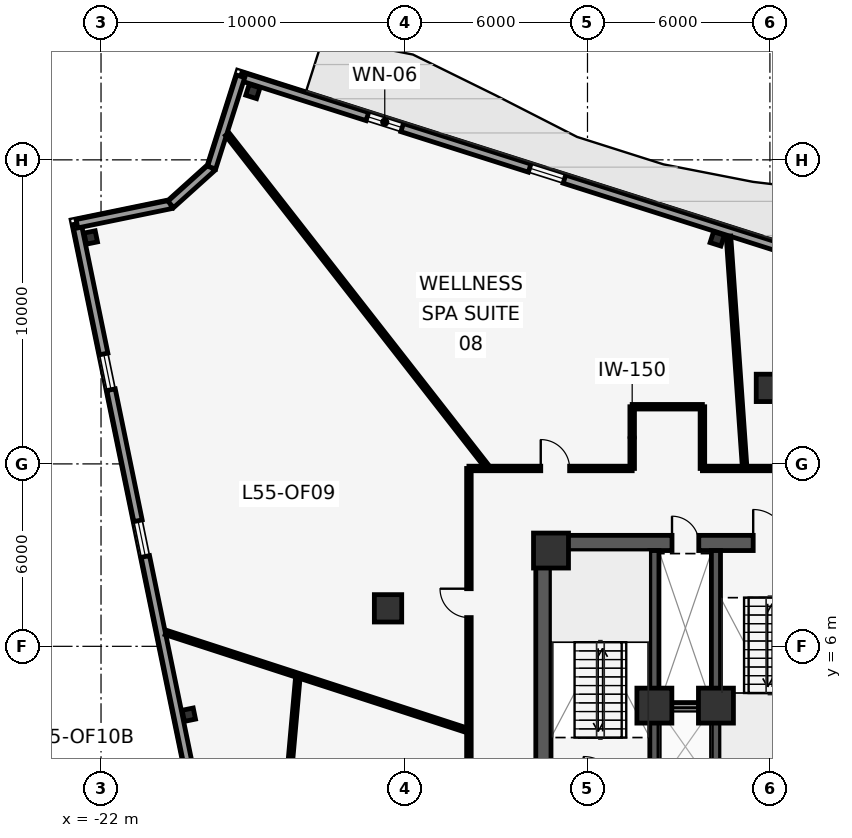
"""IFC4 building model, lengths in metres.
Left out: names, types, materials, properties, quantities, classifications, styles, units other than length and angle.
Written with IfcOpenShell. Run it as: python <this file> out.ifc"""

import sys

from ifc_helpers import new_model, si_unit, direction, frame, frame_2d, origin, origin_2d, place, context, subcontext, project, spatial, rectangle, i_section, extrude, element, fill, save


model = new_model("IFC4")
c1 = context("Model", 3, precision=1e-05, world=origin(), true_north=direction((0.0, 1.0)))
c2 = subcontext(c1, "Body", "Model", "MODEL_VIEW")
j1 = project(units=[si_unit("LENGTHUNIT", "METRE"), si_unit("PLANEANGLEUNIT", "RADIAN")], contexts=[c1])
p1 = place(None, origin())
s1 = spatial("IfcSite", under=j1, at=p1, CompositionType="ELEMENT")
p2 = place(p1, origin())
s2 = spatial("IfcBuilding", under=s1, at=p2, CompositionType="ELEMENT")
p3 = place(p2, frame((0.0, 0.0, 236.3)))
s3 = spatial("IfcBuildingStorey", under=s2, at=p3, CompositionType="ELEMENT", Elevation=236.3)
p4 = place(p3, frame((-7.45, 9.4, 0.0), z_axis=(0.0, 0.0, 1.0), x_axis=(1.0, 0.0, 0.0)))
e1 = element("IfcWall", 1, at=p4, inside=s3, PredefinedType="SHEAR", context=c2, shape_type="SweptSolid", body=[
    extrude(rectangle(XDim=14.9, YDim=0.5, at=frame_2d((7.45, 0.0))), origin(), (0.0, 0.0, 1.0), 3.85),
])
p5 = place(p4, frame((6.9, 0.0, 0.0)))
e2 = element("IfcOpeningElement", 2, at=p5, cuts=e1, PredefinedType="OPENING", context=c2, shape_type="SweptSolid", body=[
    extrude(rectangle(XDim=1.1, YDim=2.15, at=frame_2d((0.55, 1.075))), frame((0.0, 0.26, 0.0), z_axis=(0.0, -1.0, 0.0), x_axis=(1.0, 0.0, 0.0)), (0.0, 0.0, 1.0), 0.52),
])
p6 = place(p4, frame((4.23, 0.0, 0.0)))
e3 = element("IfcOpeningElement", 3, at=p6, cuts=e1, PredefinedType="OPENING", context=c2, shape_type="SweptSolid", body=[
    extrude(rectangle(XDim=0.88, YDim=2.15, at=frame_2d((0.44, 1.075))), frame((0.0, 0.26, 0.0), z_axis=(0.0, -1.0, 0.0), x_axis=(1.0, 0.0, 0.0)), (0.0, 0.0, 1.0), 0.52),
])
p7 = place(p4, frame((9.79, 0.0, 0.0)))
e4 = element("IfcOpeningElement", 4, at=p7, cuts=e1, PredefinedType="OPENING", context=c2, shape_type="SweptSolid", body=[
    extrude(rectangle(XDim=0.88, YDim=2.15, at=frame_2d((0.44, 1.075))), frame((0.0, 0.26, 0.0), z_axis=(0.0, -1.0, 0.0), x_axis=(1.0, 0.0, 0.0)), (0.0, 0.0, 1.0), 0.52),
])
for number, where, z_axis, x_axis in (
    (5, (-3.8, 1.45, 0.0), (0.0, 0.0, 1.0), (0.0, 1.0, 0.0)),
    (6, (-1.775, 1.45, 0.0), (0.0, 0.0, 1.0), (0.0, 1.0, 0.0)),
):
    element("IfcWall", number, at=place(p3, frame(where, z_axis=z_axis, x_axis=x_axis)), inside=s3, PredefinedType="SHEAR", context=c2, shape_type="SweptSolid", body=[
        extrude(rectangle(XDim=7.7, YDim=0.3, at=frame_2d((3.85, 0.0))), origin(), (0.0, 0.0, 1.0), 3.85),
    ])
p8 = place(p3, frame((-7.45, 0.1, 0.0), z_axis=(0.0, 0.0, 1.0), x_axis=(0.0, 1.0, 0.0)))
e7 = element("IfcWall", 7, at=p8, inside=s3, PredefinedType="SHEAR", context=c2, shape_type="SweptSolid", body=[
    extrude(rectangle(XDim=9.05, YDim=0.5, at=frame_2d((4.525, 0.0))), origin(), (0.0, 0.0, 1.0), 3.85),
])
for number, where, z_axis, x_axis in (
    (8, (-7.2, 9.15, 0.0), (0.0, 0.0, 1.0), (1.0, 0.0, 0.0)),
    (9, (-3.8, 4.05, 0.0), (0.0, 0.0, 1.0), (1.0, 0.0, 0.0)),
    (10, (-1.775, 4.05, 0.0), (0.0, 0.0, 1.0), (1.0, 0.0, 0.0)),
):
    element("IfcColumn", number, at=place(p3, frame(where, z_axis=z_axis, x_axis=x_axis)), inside=s3, PredefinedType="COLUMN", context=c2, shape_type="SweptSolid", body=[
        extrude(rectangle(XDim=1.15, YDim=1.15, at=origin_2d()), origin(), (0.0, 0.0, 1.0), 4.1),
    ])
for number, where, z_axis, x_axis in (
    (11, (0.0, 14.5, 0.0), (0.0, 0.0, 1.0), (1.0, 0.0, 0.0)),
    (12, (-12.56, 7.25, 0.0), (0.0, 0.0, 1.0), (1.0, 0.0, 0.0)),
):
    element("IfcColumn", number, at=place(p3, frame(where, z_axis=z_axis, x_axis=x_axis)), inside=s3, PredefinedType="COLUMN", context=c2, shape_type="SweptSolid", body=[
        extrude(rectangle(XDim=0.9, YDim=0.9, at=origin_2d()), origin(), (0.0, 0.0, 1.0), 4.1),
    ])
for number, where, z_axis, x_axis in (
    (13, (-22.337, 19.447, 0.0), (0.0, 0.0, 1.0), (-0.201, 0.98, 0.0)),
    (14, (-19.113, 3.751, 0.0), (0.0, 0.0, 1.0), (-0.201, 0.98, 0.0)),
    (15, (-1.733, 19.4, 0.0), (0.0, 0.0, 1.0), (-0.953, 0.303, 0.0)),
    (16, (-17.005, 24.248, 0.0), (0.0, 0.0, 1.0), (-0.953, 0.303, 0.0)),
):
    element("IfcColumn", number, at=place(p3, frame(where, z_axis=z_axis, x_axis=x_axis)), inside=s3, PredefinedType="COLUMN", context=c2, shape_type="SweptSolid", body=[
        extrude(i_section(OverallWidth=0.373, OverallDepth=0.373, WebThickness=0.016, FlangeThickness=0.026, at=origin_2d()), origin(), (0.0, 0.0, 1.0), 4.1),
    ])
p9 = place(p3, frame((-17.407, 24.748, 0.0), z_axis=(0.0, 0.0, 1.0), x_axis=(0.953082756031, -0.302709861346, 0.0)))
e17 = element("IfcWall", 17, at=p9, inside=s3, PredefinedType="STANDARD", context=c2, shape_type="SweptSolid", body=[
    extrude(rectangle(XDim=49.145, YDim=0.28, at=frame_2d((24.573, 0.0))), origin(), (0.0, 0.0, 1.0), 3.85),
])
p10 = place(p9, frame((24.073, 0.0, 0.0)))
e18 = element("IfcOpeningElement", 18, at=p10, cuts=e17, PredefinedType="OPENING", context=c2, shape_type="SweptSolid", body=[
    extrude(rectangle(XDim=1.0, YDim=2.15, at=frame_2d((0.5, 1.075))), frame((0.0, 0.15, 0.0), z_axis=(0.0, -1.0, 0.0), x_axis=(1.0, 0.0, 0.0)), (0.0, 0.0, 1.0), 0.3),
])
p11 = place(p9, frame((4.373, 0.0, 0.85)))
e19 = element("IfcOpeningElement", 19, at=p11, cuts=e17, PredefinedType="OPENING", context=c2, shape_type="SweptSolid", body=[
    extrude(rectangle(XDim=1.2, YDim=2.2, at=frame_2d((0.6, 1.1))), frame((0.0, 0.15, 0.0), z_axis=(0.0, -1.0, 0.0), x_axis=(1.0, 0.0, 0.0)), (0.0, 0.0, 1.0), 0.3),
])
p12 = place(p9, frame((9.973, 0.0, 0.85)))
e20 = element("IfcOpeningElement", 20, at=p12, cuts=e17, PredefinedType="OPENING", context=c2, shape_type="SweptSolid", body=[
    extrude(rectangle(XDim=1.2, YDim=2.2, at=frame_2d((0.6, 1.1))), frame((0.0, 0.15, 0.0), z_axis=(0.0, -1.0, 0.0), x_axis=(1.0, 0.0, 0.0)), (0.0, 0.0, 1.0), 0.3),
])
p13 = place(p9, frame((21.173, 0.0, 0.85)))
e21 = element("IfcOpeningElement", 21, at=p13, cuts=e17, PredefinedType="OPENING", context=c2, shape_type="SweptSolid", body=[
    extrude(rectangle(XDim=1.2, YDim=2.2, at=frame_2d((0.6, 1.1))), frame((0.0, 0.15, 0.0), z_axis=(0.0, -1.0, 0.0), x_axis=(1.0, 0.0, 0.0)), (0.0, 0.0, 1.0), 0.3),
])
p14 = place(p9, frame((37.973, 0.0, 0.85)))
e22 = element("IfcOpeningElement", 22, at=p14, cuts=e17, PredefinedType="OPENING", context=c2, shape_type="SweptSolid", body=[
    extrude(rectangle(XDim=1.2, YDim=2.2, at=frame_2d((0.6, 1.1))), frame((0.0, 0.15, 0.0), z_axis=(0.0, -1.0, 0.0), x_axis=(1.0, 0.0, 0.0)), (0.0, 0.0, 1.0), 0.3),
])
p15 = place(p9, frame((43.573, 0.0, 0.85)))
e23 = element("IfcOpeningElement", 23, at=p15, cuts=e17, PredefinedType="OPENING", context=c2, shape_type="SweptSolid", body=[
    extrude(rectangle(XDim=1.2, YDim=2.2, at=frame_2d((0.6, 1.1))), frame((0.0, 0.15, 0.0), z_axis=(0.0, -1.0, 0.0), x_axis=(1.0, 0.0, 0.0)), (0.0, 0.0, 1.0), 0.3),
])
p16 = place(p3, frame((30.935, 2.916, 0.0), z_axis=(0.0, 0.0, 1.0), x_axis=(-0.743143233829, -0.66913237406, 0.0)))
e24 = element("IfcWall", 24, at=p16, inside=s3, PredefinedType="STANDARD", context=c2, shape_type="SweptSolid", body=[
    extrude(rectangle(XDim=49.88, YDim=0.28, at=frame_2d((24.94, 0.0))), origin(), (0.0, 0.0, 1.0), 3.85),
])
p17 = place(p16, frame((24.44, 0.0, 0.0)))
e25 = element("IfcOpeningElement", 25, at=p17, cuts=e24, PredefinedType="OPENING", context=c2, shape_type="SweptSolid", body=[
    extrude(rectangle(XDim=1.0, YDim=2.15, at=frame_2d((0.5, 1.075))), frame((0.0, 0.15, 0.0), z_axis=(0.0, -1.0, 0.0), x_axis=(1.0, 0.0, 0.0)), (0.0, 0.0, 1.0), 0.3),
])
p18 = place(p16, frame((4.74, 0.0, 0.85)))
e26 = element("IfcOpeningElement", 26, at=p18, cuts=e24, PredefinedType="OPENING", context=c2, shape_type="SweptSolid", body=[
    extrude(rectangle(XDim=1.2, YDim=2.2, at=frame_2d((0.6, 1.1))), frame((0.0, 0.15, 0.0), z_axis=(0.0, -1.0, 0.0), x_axis=(1.0, 0.0, 0.0)), (0.0, 0.0, 1.0), 0.3),
])
p19 = place(p16, frame((10.34, 0.0, 0.85)))
e27 = element("IfcOpeningElement", 27, at=p19, cuts=e24, PredefinedType="OPENING", context=c2, shape_type="SweptSolid", body=[
    extrude(rectangle(XDim=1.2, YDim=2.2, at=frame_2d((0.6, 1.1))), frame((0.0, 0.15, 0.0), z_axis=(0.0, -1.0, 0.0), x_axis=(1.0, 0.0, 0.0)), (0.0, 0.0, 1.0), 0.3),
])
p20 = place(p16, frame((27.14, 0.0, 0.85)))
e28 = element("IfcOpeningElement", 28, at=p20, cuts=e24, PredefinedType="OPENING", context=c2, shape_type="SweptSolid", body=[
    extrude(rectangle(XDim=1.2, YDim=2.2, at=frame_2d((0.6, 1.1))), frame((0.0, 0.15, 0.0), z_axis=(0.0, -1.0, 0.0), x_axis=(1.0, 0.0, 0.0)), (0.0, 0.0, 1.0), 0.3),
])
p21 = place(p16, frame((38.34, 0.0, 0.85)))
e29 = element("IfcOpeningElement", 29, at=p21, cuts=e24, PredefinedType="OPENING", context=c2, shape_type="SweptSolid", body=[
    extrude(rectangle(XDim=1.2, YDim=2.2, at=frame_2d((0.6, 1.1))), frame((0.0, 0.15, 0.0), z_axis=(0.0, -1.0, 0.0), x_axis=(1.0, 0.0, 0.0)), (0.0, 0.0, 1.0), 0.3),
])
p22 = place(p16, frame((43.94, 0.0, 0.85)))
e30 = element("IfcOpeningElement", 30, at=p22, cuts=e24, PredefinedType="OPENING", context=c2, shape_type="SweptSolid", body=[
    extrude(rectangle(XDim=1.2, YDim=2.2, at=frame_2d((0.6, 1.1))), frame((0.0, 0.15, 0.0), z_axis=(0.0, -1.0, 0.0), x_axis=(1.0, 0.0, 0.0)), (0.0, 0.0, 1.0), 0.3),
])
p23 = place(p3, frame((-12.893, -28.239, 0.0), z_axis=(0.0, 0.0, 1.0), x_axis=(-0.201426823496, 0.979503565474, 0.0)))
e31 = element("IfcWall", 31, at=p23, inside=s3, PredefinedType="STANDARD", context=c2, shape_type="SweptSolid", body=[
    extrude(rectangle(XDim=49.145, YDim=0.28, at=frame_2d((24.573, 0.0))), origin(), (0.0, 0.0, 1.0), 3.85),
])
p24 = place(p23, frame((4.373, 0.0, 0.85)))
e32 = element("IfcOpeningElement", 32, at=p24, cuts=e31, PredefinedType="OPENING", context=c2, shape_type="SweptSolid", body=[
    extrude(rectangle(XDim=1.2, YDim=2.2, at=frame_2d((0.6, 1.1))), frame((0.0, 0.15, 0.0), z_axis=(0.0, -1.0, 0.0), x_axis=(1.0, 0.0, 0.0)), (0.0, 0.0, 1.0), 0.3),
])
p25 = place(p23, frame((9.973, 0.0, 0.85)))
e33 = element("IfcOpeningElement", 33, at=p25, cuts=e31, PredefinedType="OPENING", context=c2, shape_type="SweptSolid", body=[
    extrude(rectangle(XDim=1.2, YDim=2.2, at=frame_2d((0.6, 1.1))), frame((0.0, 0.15, 0.0), z_axis=(0.0, -1.0, 0.0), x_axis=(1.0, 0.0, 0.0)), (0.0, 0.0, 1.0), 0.3),
])
p26 = place(p23, frame((21.173, 0.0, 0.85)))
e34 = element("IfcOpeningElement", 34, at=p26, cuts=e31, PredefinedType="OPENING", context=c2, shape_type="SweptSolid", body=[
    extrude(rectangle(XDim=1.2, YDim=2.2, at=frame_2d((0.6, 1.1))), frame((0.0, 0.15, 0.0), z_axis=(0.0, -1.0, 0.0), x_axis=(1.0, 0.0, 0.0)), (0.0, 0.0, 1.0), 0.3),
])
p27 = place(p23, frame((26.773, 0.0, 0.85)))
e35 = element("IfcOpeningElement", 35, at=p27, cuts=e31, PredefinedType="OPENING", context=c2, shape_type="SweptSolid", body=[
    extrude(rectangle(XDim=1.2, YDim=2.2, at=frame_2d((0.6, 1.1))), frame((0.0, 0.15, 0.0), z_axis=(0.0, -1.0, 0.0), x_axis=(1.0, 0.0, 0.0)), (0.0, 0.0, 1.0), 0.3),
])
p28 = place(p23, frame((37.973, 0.0, 0.85)))
e36 = element("IfcOpeningElement", 36, at=p28, cuts=e31, PredefinedType="OPENING", context=c2, shape_type="SweptSolid", body=[
    extrude(rectangle(XDim=1.2, YDim=2.2, at=frame_2d((0.6, 1.1))), frame((0.0, 0.15, 0.0), z_axis=(0.0, -1.0, 0.0), x_axis=(1.0, 0.0, 0.0)), (0.0, 0.0, 1.0), 0.3),
])
p29 = place(p23, frame((43.573, 0.0, 0.85)))
e37 = element("IfcOpeningElement", 37, at=p29, cuts=e31, PredefinedType="OPENING", context=c2, shape_type="SweptSolid", body=[
    extrude(rectangle(XDim=1.2, YDim=2.2, at=frame_2d((0.6, 1.1))), frame((0.0, 0.15, 0.0), z_axis=(0.0, -1.0, 0.0), x_axis=(1.0, 0.0, 0.0)), (0.0, 0.0, 1.0), 0.3),
])
p30 = place(p3, frame((-22.792, 19.899, 0.0), z_axis=(0.0, 0.0, 1.0), x_axis=(0.979502474011, 0.201432131016, 0.0)))
e38 = element("IfcWall", 38, at=p30, inside=s3, PredefinedType="STANDARD", context=c2, shape_type="SweptSolid", body=[
    extrude(rectangle(XDim=3.151, YDim=0.28, at=frame_2d((1.576, 0.0))), origin(), (0.0, 0.0, 1.0), 3.85),
])
p31 = place(p3, frame((-19.706, 20.533, 0.0), z_axis=(0.0, 0.0, 1.0), x_axis=(0.743173371482, 0.669098901449, 0.0)))
e39 = element("IfcWall", 39, at=p31, inside=s3, PredefinedType="STANDARD", context=c2, shape_type="SweptSolid", body=[
    extrude(rectangle(XDim=1.809, YDim=0.28, at=frame_2d((0.905, 0.0))), origin(), (0.0, 0.0, 1.0), 3.85),
])
p32 = place(p3, frame((-18.361, 21.744, 0.0), z_axis=(0.0, 0.0, 1.0), x_axis=(0.302691963624, 0.953088440365, 0.0)))
e40 = element("IfcWall", 40, at=p32, inside=s3, PredefinedType="STANDARD", context=c2, shape_type="SweptSolid", body=[
    extrude(rectangle(XDim=3.151, YDim=0.28, at=frame_2d((1.576, 0.0))), origin(), (0.0, 0.0, 1.0), 3.85),
])
p33 = place(p3, frame((-3.65, 4.05, 0.0), z_axis=(0.0, 0.0, 1.0), x_axis=(1.0, 0.0, 0.0)))
e41 = element("IfcWall", 41, at=p33, inside=s3, PredefinedType="PARTITIONING", context=c2, shape_type="SweptSolid", body=[
    extrude(rectangle(XDim=1.73, YDim=0.2, at=frame_2d((0.865, 0.0))), origin(), (0.0, 0.0, 1.0), 3.85),
])
p34 = place(p3, frame((-9.9, -11.7, 0.0), z_axis=(0.0, 0.0, 1.0), x_axis=(0.0, 1.0, 0.0)))
e42 = element("IfcWall", 42, at=p34, inside=s3, PredefinedType="PARTITIONING", context=c2, shape_type="SweptSolid", body=[
    extrude(rectangle(XDim=23.55, YDim=0.15, at=frame_2d((11.775, 0.0))), origin(), (0.0, 0.0, 1.0), 3.85),
])
p35 = place(p34, frame((6.145, 0.0, 0.0)))
e43 = element("IfcOpeningElement", 43, at=p35, cuts=e42, PredefinedType="OPENING", context=c2, shape_type="SweptSolid", body=[
    extrude(rectangle(XDim=0.95, YDim=2.15, at=frame_2d((0.475, 1.075))), frame((0.0, 0.085, 0.0), z_axis=(0.0, -1.0, 0.0), x_axis=(1.0, 0.0, 0.0)), (0.0, 0.0, 1.0), 0.17),
])
p36 = place(p34, frame((18.645, 0.0, 0.0)))
e44 = element("IfcOpeningElement", 44, at=p36, cuts=e42, PredefinedType="OPENING", context=c2, shape_type="SweptSolid", body=[
    extrude(rectangle(XDim=0.95, YDim=2.15, at=frame_2d((0.475, 1.075))), frame((0.0, 0.085, 0.0), z_axis=(0.0, -1.0, 0.0), x_axis=(1.0, 0.0, 0.0)), (0.0, 0.0, 1.0), 0.17),
])
p37 = place(p34, frame((11.967, 0.0, 0.0)))
e45 = element("IfcOpeningElement", 45, at=p37, cuts=e42, PredefinedType="OPENING", context=c2, shape_type="SweptSolid", body=[
    extrude(rectangle(XDim=0.95, YDim=2.15, at=frame_2d((0.475, 1.075))), frame((0.0, 0.085, 0.0), z_axis=(0.0, -1.0, 0.0), x_axis=(1.0, 0.0, 0.0)), (0.0, 0.0, 1.0), 0.17),
])
p38 = place(p3, frame((-9.9, 11.85, 0.0), z_axis=(0.0, 0.0, 1.0), x_axis=(1.0, 0.0, 0.0)))
e46 = element("IfcWall", 46, at=p38, inside=s3, PredefinedType="PARTITIONING", context=c2, shape_type="SweptSolid", body=[
    extrude(rectangle(XDim=5.37, YDim=0.15, at=frame_2d((2.685, 0.0))), origin(), (0.0, 0.0, 1.0), 3.85),
])
p39 = place(p38, frame((2.363, 0.0, 0.0)))
e47 = element("IfcOpeningElement", 47, at=p39, cuts=e46, PredefinedType="OPENING", context=c2, shape_type="SweptSolid", body=[
    extrude(rectangle(XDim=0.95, YDim=2.15, at=frame_2d((0.475, 1.075))), frame((0.0, 0.085, 0.0), z_axis=(0.0, -1.0, 0.0), x_axis=(1.0, 0.0, 0.0)), (0.0, 0.0, 1.0), 0.17),
])
p40 = place(p3, frame((-4.53, 11.85, 0.0), z_axis=(0.0, 0.0, 1.0), x_axis=(0.0, 1.0, 0.0)))
e48 = element("IfcWall", 48, at=p40, inside=s3, PredefinedType="PARTITIONING", context=c2, shape_type="SweptSolid", body=[
    extrude(rectangle(XDim=2.03, YDim=0.15, at=frame_2d((1.015, 0.0))), origin(), (0.0, 0.0, 1.0), 3.85),
])
p41 = place(p3, frame((-4.53, 13.88, 0.0), z_axis=(0.0, 0.0, 1.0), x_axis=(1.0, 0.0, 0.0)))
e49 = element("IfcWall", 49, at=p41, inside=s3, PredefinedType="PARTITIONING", context=c2, shape_type="SweptSolid", body=[
    extrude(rectangle(XDim=2.31, YDim=0.15, at=frame_2d((1.155, 0.0))), origin(), (0.0, 0.0, 1.0), 3.85),
])
p42 = place(p3, frame((-2.22, 13.88, 0.0), z_axis=(0.0, 0.0, 1.0), x_axis=(0.0, -1.0, 0.0)))
e50 = element("IfcWall", 50, at=p42, inside=s3, PredefinedType="PARTITIONING", context=c2, shape_type="SweptSolid", body=[
    extrude(rectangle(XDim=2.03, YDim=0.15, at=frame_2d((1.015, 0.0))), origin(), (0.0, 0.0, 1.0), 3.85),
])
p43 = place(p3, frame((-2.22, 11.85, 0.0), z_axis=(0.0, 0.0, 1.0), x_axis=(1.0, 0.0, 0.0)))
e51 = element("IfcWall", 51, at=p43, inside=s3, PredefinedType="PARTITIONING", context=c2, shape_type="SweptSolid", body=[
    extrude(rectangle(XDim=12.12, YDim=0.15, at=frame_2d((6.06, 0.0))), origin(), (0.0, 0.0, 1.0), 3.85),
])
p44 = place(p43, frame((4.774, 0.0, 0.0)))
e52 = element("IfcOpeningElement", 52, at=p44, cuts=e51, PredefinedType="OPENING", context=c2, shape_type="SweptSolid", body=[
    extrude(rectangle(XDim=0.95, YDim=2.15, at=frame_2d((0.475, 1.075))), frame((0.0, 0.085, 0.0), z_axis=(0.0, -1.0, 0.0), x_axis=(1.0, 0.0, 0.0)), (0.0, 0.0, 1.0), 0.17),
])
p45 = place(p3, frame((-0.836, 11.955, 0.0), z_axis=(0.0, 0.0, 1.0), x_axis=(-0.069760607816, 0.997563761169, 0.0)))
e53 = element("IfcWall", 53, at=p45, inside=s3, PredefinedType="PARTITIONING", context=c2, shape_type="SweptSolid", body=[
    extrude(rectangle(XDim=7.552, YDim=0.15, at=frame_2d((3.776, 0.0))), origin(), (0.0, 0.0, 1.0), 3.85),
])
p46 = place(p3, frame((-9.34, 11.955, 0.0), z_axis=(0.0, 0.0, 1.0), x_axis=(-0.615663582136, 0.788009107582, 0.0)))
e54 = element("IfcWall", 54, at=p46, inside=s3, PredefinedType="PARTITIONING", context=c2, shape_type="SweptSolid", body=[
    extrude(rectangle(XDim=13.82, YDim=0.15, at=frame_2d((6.91, 0.0))), origin(), (0.0, 0.0, 1.0), 3.85),
])
p47 = place(p3, frame((-10.005, 3.251, 0.0), z_axis=(0.0, 0.0, 1.0), x_axis=(-0.951056724961, 0.309016352167, 0.0)))
e55 = element("IfcWall", 55, at=p47, inside=s3, PredefinedType="PARTITIONING", context=c2, shape_type="SweptSolid", body=[
    extrude(rectangle(XDim=10.373, YDim=0.15, at=frame_2d((5.186, 0.0))), origin(), (0.0, 0.0, 1.0), 3.85),
])
p48 = place(p3, frame((-15.524, 5.018, 0.0), z_axis=(0.0, 0.0, 1.0), x_axis=(-0.088751444217, -0.996053804345, 0.0)))
e56 = element("IfcWall", 56, at=p48, inside=s3, PredefinedType="PARTITIONING", context=c2, shape_type="SweptSolid", body=[
    extrude(rectangle(XDim=7.884, YDim=0.15, at=frame_2d((3.942, 0.0))), origin(), (0.0, 0.0, 1.0), 3.415),
])
p49 = place(p48, frame((3.492, 0.0, 0.0)))
e57 = element("IfcOpeningElement", 57, at=p49, cuts=e56, PredefinedType="OPENING", context=c2, shape_type="SweptSolid", body=[
    extrude(rectangle(XDim=0.9, YDim=2.1, at=frame_2d((0.45, 1.05))), frame((0.0, 0.085, 0.0), z_axis=(0.0, -1.0, 0.0), x_axis=(1.0, 0.0, 0.0)), (0.0, 0.0, 1.0), 0.17),
])
p50 = place(p11, origin())
e58 = element("IfcWindow", 58, at=p50, inside=s3, PartitioningType="SINGLE_PANEL", PredefinedType="WINDOW", context=c2, shape_type="SweptSolid", body=[
    extrude(rectangle(XDim=1.2, YDim=2.2, at=frame_2d((0.6, 1.1))), frame((0.0, 0.03, 0.0), z_axis=(0.0, -1.0, 0.0), x_axis=(1.0, 0.0, 0.0)), (0.0, 0.0, 1.0), 0.06),
])
fill(e19, e58)
p51 = place(p12, origin())
e59 = element("IfcWindow", 59, at=p51, inside=s3, PartitioningType="SINGLE_PANEL", PredefinedType="WINDOW", context=c2, shape_type="SweptSolid", body=[
    extrude(rectangle(XDim=1.2, YDim=2.2, at=frame_2d((0.6, 1.1))), frame((0.0, 0.03, 0.0), z_axis=(0.0, -1.0, 0.0), x_axis=(1.0, 0.0, 0.0)), (0.0, 0.0, 1.0), 0.06),
])
fill(e20, e59)
p52 = place(p28, origin())
e60 = element("IfcWindow", 60, at=p52, inside=s3, PartitioningType="SINGLE_PANEL", PredefinedType="WINDOW", context=c2, shape_type="SweptSolid", body=[
    extrude(rectangle(XDim=1.2, YDim=2.2, at=frame_2d((0.6, 1.1))), frame((0.0, 0.03, 0.0), z_axis=(0.0, -1.0, 0.0), x_axis=(1.0, 0.0, 0.0)), (0.0, 0.0, 1.0), 0.06),
])
fill(e36, e60)
p53 = place(p29, origin())
e61 = element("IfcWindow", 61, at=p53, inside=s3, PartitioningType="SINGLE_PANEL", PredefinedType="WINDOW", context=c2, shape_type="SweptSolid", body=[
    extrude(rectangle(XDim=1.2, YDim=2.2, at=frame_2d((0.6, 1.1))), frame((0.0, 0.03, 0.0), z_axis=(0.0, -1.0, 0.0), x_axis=(1.0, 0.0, 0.0)), (0.0, 0.0, 1.0), 0.06),
])
fill(e37, e61)
p54 = place(p5, origin())
e62 = element("IfcDoor", 62, at=p54, inside=s3, OperationType="SINGLE_SWING_LEFT", PredefinedType="DOOR", context=c2, shape_type="SweptSolid", body=[
    extrude(rectangle(XDim=1.1, YDim=2.15, at=frame_2d((0.55, 1.075))), frame((0.0, 0.025, 0.0), z_axis=(0.0, -1.0, 0.0), x_axis=(1.0, 0.0, 0.0)), (0.0, 0.0, 1.0), 0.05),
])
fill(e2, e62)
p55 = place(p6, origin())
e63 = element("IfcDoor", 63, at=p55, inside=s3, OperationType="SINGLE_SWING_LEFT", PredefinedType="DOOR", context=c2, shape_type="SweptSolid", body=[
    extrude(rectangle(XDim=0.88, YDim=2.15, at=frame_2d((0.44, 1.075))), frame((0.0, 0.025, 0.0), z_axis=(0.0, -1.0, 0.0), x_axis=(1.0, 0.0, 0.0)), (0.0, 0.0, 1.0), 0.05),
])
fill(e3, e63)
p56 = place(p39, origin())
e64 = element("IfcDoor", 64, at=p56, inside=s3, OperationType="SINGLE_SWING_LEFT", PredefinedType="DOOR", context=c2, shape_type="SweptSolid", body=[
    extrude(rectangle(XDim=0.95, YDim=2.15, at=frame_2d((0.475, 1.075))), frame((0.0, 0.025, 0.0), z_axis=(0.0, -1.0, 0.0), x_axis=(1.0, 0.0, 0.0)), (0.0, 0.0, 1.0), 0.05),
])
fill(e47, e64)
p57 = place(p36, origin())
e65 = element("IfcDoor", 65, at=p57, inside=s3, OperationType="SINGLE_SWING_RIGHT", PredefinedType="DOOR", context=c2, shape_type="SweptSolid", body=[
    extrude(rectangle(XDim=0.95, YDim=2.15, at=frame_2d((0.475, 1.075))), frame((0.0, 0.025, 0.0), z_axis=(0.0, -1.0, 0.0), x_axis=(1.0, 0.0, 0.0)), (0.0, 0.0, 1.0), 0.05),
])
fill(e44, e65)
save(model, sys.argv[1])
